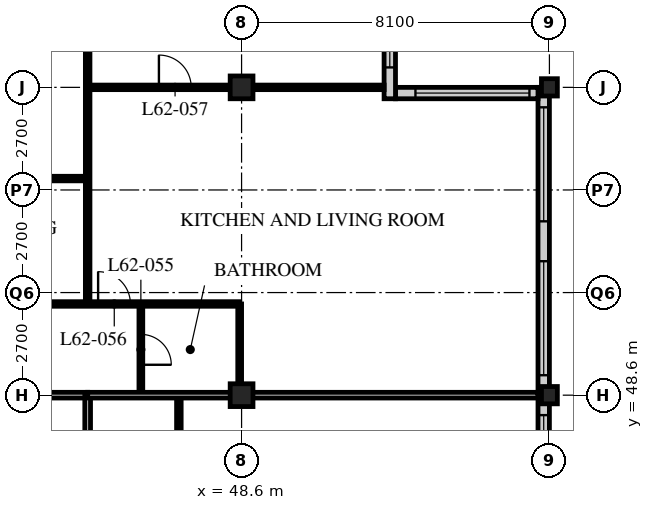
"""IFC4 building model, lengths in metres.
Left out: names, types, materials, properties, quantities, classifications, styles, units other than length and angle.
Written with IfcOpenShell. Run it as: python <this file> out.ifc"""

import sys

from ifc_helpers import new_model, si_unit, direction, frame, frame_2d, origin, origin_2d, place, context, subcontext, project, spatial, rectangle, hollow_rectangle, i_section, extrude, element, fill, save


model = new_model("IFC4")
c1 = context("Model", 3, precision=1e-05, world=origin(), true_north=direction((0.0, 1.0)))
c2 = subcontext(c1, "Body", "Model", "MODEL_VIEW")
j1 = project(units=[si_unit("LENGTHUNIT", "METRE"), si_unit("PLANEANGLEUNIT", "RADIAN")], contexts=[c1])
p1 = place(None, origin())
s1 = spatial("IfcSite", under=j1, at=p1, CompositionType="ELEMENT")
p2 = place(p1, origin())
s2 = spatial("IfcBuilding", under=s1, at=p2, CompositionType="ELEMENT")
p3 = place(p2, frame((0.0, 0.0, 242.4)))
s3 = spatial("IfcBuildingStorey", under=s2, at=p3, CompositionType="ELEMENT", Elevation=242.4)
for number, where, z_axis, x_axis in (
    (1, (48.6, 48.6, 0.0), (0.0, 0.0, 1.0), (1.0, 0.0, 0.0)),
    (2, (48.6, 56.7, 0.0), (0.0, 0.0, 1.0), (1.0, 0.0, 0.0)),
):
    element("IfcColumn", number, at=place(p3, frame(where, z_axis=z_axis, x_axis=x_axis)), inside=s3, PredefinedType="COLUMN", context=c2, shape_type="SweptSolid", body=[
        extrude(hollow_rectangle(XDim=0.6, YDim=0.6, WallThickness=0.05, at=origin_2d()), origin(), (0.0, 0.0, 1.0), 3.9),
    ])
for number, where, z_axis, x_axis in (
    (3, (56.7, 48.6, 0.0), (0.0, 0.0, 1.0), (1.0, 0.0, 0.0)),
    (4, (56.7, 56.7, 0.0), (0.0, 0.0, 1.0), (1.0, 0.0, 0.0)),
):
    element("IfcColumn", number, at=place(p3, frame(where, z_axis=z_axis, x_axis=x_axis)), inside=s3, PredefinedType="COLUMN", context=c2, shape_type="SweptSolid", body=[
        extrude(i_section(OverallWidth=0.418, OverallDepth=0.456, WebThickness=0.042, FlangeThickness=0.067, FilletRadius=0.015, at=origin_2d()), origin(), (0.0, 0.0, 1.0), 3.9),
    ])
p4 = place(p3, frame((56.55, 24.6, 0.0), z_axis=(0.0, 0.0, 1.0), x_axis=(0.0, 1.0, 0.0)))
e5 = element("IfcWall", 5, at=p4, inside=s3, PredefinedType="SOLIDWALL", context=c2, shape_type="SweptSolid", body=[
    extrude(rectangle(XDim=32.1, YDim=0.3, at=frame_2d((16.05, 0.0))), origin(), (0.0, 0.0, 1.0), 3.69),
])
p5 = place(p4, frame((0.225, 0.0, 0.6)))
e6 = element("IfcOpeningElement", 6, at=p5, cuts=e5, PredefinedType="OPENING", context=c2, shape_type="SweptSolid", body=[
    extrude(rectangle(XDim=3.0, YDim=2.3, at=frame_2d((1.5, 1.15))), frame((0.0, 0.16, 0.0), z_axis=(0.0, -1.0, 0.0), x_axis=(1.0, 0.0, 0.0)), (0.0, 0.0, 1.0), 0.32),
])
p6 = place(p4, frame((4.275, 0.0, 0.6)))
e7 = element("IfcOpeningElement", 7, at=p6, cuts=e5, PredefinedType="OPENING", context=c2, shape_type="SweptSolid", body=[
    extrude(rectangle(XDim=3.0, YDim=2.3, at=frame_2d((1.5, 1.15))), frame((0.0, 0.16, 0.0), z_axis=(0.0, -1.0, 0.0), x_axis=(1.0, 0.0, 0.0)), (0.0, 0.0, 1.0), 0.32),
])
p7 = place(p4, frame((8.325, 0.0, 0.6)))
e8 = element("IfcOpeningElement", 8, at=p7, cuts=e5, PredefinedType="OPENING", context=c2, shape_type="SweptSolid", body=[
    extrude(rectangle(XDim=3.0, YDim=2.3, at=frame_2d((1.5, 1.15))), frame((0.0, 0.16, 0.0), z_axis=(0.0, -1.0, 0.0), x_axis=(1.0, 0.0, 0.0)), (0.0, 0.0, 1.0), 0.32),
])
p8 = place(p4, frame((12.375, 0.0, 0.6)))
e9 = element("IfcOpeningElement", 9, at=p8, cuts=e5, PredefinedType="OPENING", context=c2, shape_type="SweptSolid", body=[
    extrude(rectangle(XDim=3.0, YDim=2.3, at=frame_2d((1.5, 1.15))), frame((0.0, 0.16, 0.0), z_axis=(0.0, -1.0, 0.0), x_axis=(1.0, 0.0, 0.0)), (0.0, 0.0, 1.0), 0.32),
])
p9 = place(p4, frame((16.425, 0.0, 0.6)))
e10 = element("IfcOpeningElement", 10, at=p9, cuts=e5, PredefinedType="OPENING", context=c2, shape_type="SweptSolid", body=[
    extrude(rectangle(XDim=3.0, YDim=2.3, at=frame_2d((1.5, 1.15))), frame((0.0, 0.16, 0.0), z_axis=(0.0, -1.0, 0.0), x_axis=(1.0, 0.0, 0.0)), (0.0, 0.0, 1.0), 0.32),
])
p10 = place(p4, frame((20.475, 0.0, 0.6)))
e11 = element("IfcOpeningElement", 11, at=p10, cuts=e5, PredefinedType="OPENING", context=c2, shape_type="SweptSolid", body=[
    extrude(rectangle(XDim=3.0, YDim=2.3, at=frame_2d((1.5, 1.15))), frame((0.0, 0.16, 0.0), z_axis=(0.0, -1.0, 0.0), x_axis=(1.0, 0.0, 0.0)), (0.0, 0.0, 1.0), 0.32),
])
p11 = place(p4, frame((24.525, 0.0, 0.6)))
e12 = element("IfcOpeningElement", 12, at=p11, cuts=e5, PredefinedType="OPENING", context=c2, shape_type="SweptSolid", body=[
    extrude(rectangle(XDim=3.0, YDim=2.3, at=frame_2d((1.5, 1.15))), frame((0.0, 0.16, 0.0), z_axis=(0.0, -1.0, 0.0), x_axis=(1.0, 0.0, 0.0)), (0.0, 0.0, 1.0), 0.32),
])
p12 = place(p4, frame((28.575, 0.0, 0.6)))
e13 = element("IfcOpeningElement", 13, at=p12, cuts=e5, PredefinedType="OPENING", context=c2, shape_type="SweptSolid", body=[
    extrude(rectangle(XDim=3.0, YDim=2.3, at=frame_2d((1.5, 1.15))), frame((0.0, 0.16, 0.0), z_axis=(0.0, -1.0, 0.0), x_axis=(1.0, 0.0, 0.0)), (0.0, 0.0, 1.0), 0.32),
])
p13 = place(p3, frame((56.4, 56.55, 0.0), z_axis=(0.0, 0.0, 1.0), x_axis=(-1.0, 0.0, 0.0)))
e14 = element("IfcWall", 14, at=p13, inside=s3, PredefinedType="SOLIDWALL", context=c2, shape_type="SweptSolid", body=[
    extrude(rectangle(XDim=3.75, YDim=0.3, at=frame_2d((1.875, 0.0))), origin(), (0.0, 0.0, 1.0), 3.69),
])
p14 = place(p13, frame((0.225, 0.0, 0.6)))
e15 = element("IfcOpeningElement", 15, at=p14, cuts=e14, PredefinedType="OPENING", context=c2, shape_type="SweptSolid", body=[
    extrude(rectangle(XDim=3.0, YDim=2.3, at=frame_2d((1.5, 1.15))), frame((0.0, 0.16, 0.0), z_axis=(0.0, -1.0, 0.0), x_axis=(1.0, 0.0, 0.0)), (0.0, 0.0, 1.0), 0.32),
])
p15 = place(p3, frame((52.5, 56.4, 0.0), z_axis=(0.0, 0.0, 1.0), x_axis=(0.0, 1.0, 0.0)))
e16 = element("IfcWall", 16, at=p15, inside=s3, PredefinedType="SOLIDWALL", context=c2, shape_type="SweptSolid", body=[
    extrude(rectangle(XDim=4.35, YDim=0.3, at=frame_2d((2.175, 0.0))), origin(), (0.0, 0.0, 1.0), 3.69),
])
p16 = place(p15, frame((0.825, 0.0, 0.6)))
e17 = element("IfcOpeningElement", 17, at=p16, cuts=e16, PredefinedType="OPENING", context=c2, shape_type="SweptSolid", body=[
    extrude(rectangle(XDim=3.0, YDim=2.3, at=frame_2d((1.5, 1.15))), frame((0.0, 0.16, 0.0), z_axis=(0.0, -1.0, 0.0), x_axis=(1.0, 0.0, 0.0)), (0.0, 0.0, 1.0), 0.32),
])
p17 = place(p3, frame((12.15, 48.6, 0.0), z_axis=(0.0, 0.0, 1.0), x_axis=(1.0, 0.0, 0.0)))
e18 = element("IfcWall", 18, at=p17, inside=s3, PredefinedType="PARTITIONING", context=c2, shape_type="SweptSolid", body=[
    extrude(rectangle(XDim=32.4, YDim=0.15, at=frame_2d((16.2, 0.0))), origin(), (0.0, 0.0, 1.0), 2.928),
])
p18 = place(p17, frame((4.95, 0.0, 0.0)))
e19 = element("IfcOpeningElement", 19, at=p18, cuts=e18, PredefinedType="OPENING", context=c2, shape_type="SweptSolid", body=[
    extrude(rectangle(XDim=1.0, YDim=2.1, at=frame_2d((0.5, 1.05))), frame((0.0, 0.085, 0.0), z_axis=(0.0, -1.0, 0.0), x_axis=(1.0, 0.0, 0.0)), (0.0, 0.0, 1.0), 0.17),
])
p19 = place(p17, frame((21.15, 0.0, 0.0)))
e20 = element("IfcOpeningElement", 20, at=p19, cuts=e18, PredefinedType="OPENING", context=c2, shape_type="SweptSolid", body=[
    extrude(rectangle(XDim=1.0, YDim=2.1, at=frame_2d((0.5, 1.05))), frame((0.0, 0.085, 0.0), z_axis=(0.0, -1.0, 0.0), x_axis=(1.0, 0.0, 0.0)), (0.0, 0.0, 1.0), 0.17),
])
p20 = place(p17, frame((29.875, 0.0, 0.0)))
e21 = element("IfcOpeningElement", 21, at=p20, cuts=e18, PredefinedType="OPENING", context=c2, shape_type="SweptSolid", body=[
    extrude(rectangle(XDim=1.0, YDim=2.1, at=frame_2d((0.5, 1.05))), frame((0.0, 0.085, 0.0), z_axis=(0.0, -1.0, 0.0), x_axis=(1.0, 0.0, 0.0)), (0.0, 0.0, 1.0), 0.17),
])
p21 = place(p17, frame((1.525, 0.0, 0.0)))
e22 = element("IfcOpeningElement", 22, at=p21, cuts=e18, PredefinedType="OPENING", context=c2, shape_type="SweptSolid", body=[
    extrude(rectangle(XDim=1.0, YDim=2.1, at=frame_2d((0.5, 1.05))), frame((0.0, 0.085, 0.0), z_axis=(0.0, -1.0, 0.0), x_axis=(1.0, 0.0, 0.0)), (0.0, 0.0, 1.0), 0.17),
])
p22 = place(p3, frame((44.55, 22.5, 0.0), z_axis=(0.0, 0.0, 1.0), x_axis=(0.0, 1.0, 0.0)))
e23 = element("IfcWall", 23, at=p22, inside=s3, PredefinedType="PARTITIONING", context=c2, shape_type="SweptSolid", body=[
    extrude(rectangle(XDim=26.1, YDim=0.15, at=frame_2d((13.05, 0.0))), origin(), (0.0, 0.0, 1.0), 3.69),
])
p23 = place(p22, frame((0.4, 0.0, 0.0)))
e24 = element("IfcOpeningElement", 24, at=p23, cuts=e23, PredefinedType="OPENING", context=c2, shape_type="SweptSolid", body=[
    extrude(rectangle(XDim=1.0, YDim=2.1, at=frame_2d((0.5, 1.05))), frame((0.0, 0.085, 0.0), z_axis=(0.0, -1.0, 0.0), x_axis=(1.0, 0.0, 0.0)), (0.0, 0.0, 1.0), 0.17),
])
p24 = place(p22, frame((10.3, 0.0, 0.0)))
e25 = element("IfcOpeningElement", 25, at=p24, cuts=e23, PredefinedType="OPENING", context=c2, shape_type="SweptSolid", body=[
    extrude(rectangle(XDim=1.0, YDim=2.1, at=frame_2d((0.5, 1.05))), frame((0.0, 0.085, 0.0), z_axis=(0.0, -1.0, 0.0), x_axis=(1.0, 0.0, 0.0)), (0.0, 0.0, 1.0), 0.17),
])
p25 = place(p3, frame((46.95, 22.5, 0.0), z_axis=(0.0, 0.0, 1.0), x_axis=(0.0, 1.0, 0.0)))
e26 = element("IfcWall", 26, at=p25, inside=s3, PredefinedType="PARTITIONING", context=c2, shape_type="SweptSolid", body=[
    extrude(rectangle(XDim=26.1, YDim=0.12, at=frame_2d((13.05, 0.0))), origin(), (0.0, 0.0, 1.0), 3.69),
])
p26 = place(p25, frame((0.975, 0.0, 0.0)))
e27 = element("IfcOpeningElement", 27, at=p26, cuts=e26, PredefinedType="OPENING", context=c2, shape_type="SweptSolid", body=[
    extrude(rectangle(XDim=0.85, YDim=2.1, at=frame_2d((0.425, 1.05))), frame((0.0, 0.07, 0.0), z_axis=(0.0, -1.0, 0.0), x_axis=(1.0, 0.0, 0.0)), (0.0, 0.0, 1.0), 0.14),
])
p27 = place(p25, frame((6.175, 0.0, 0.0)))
e28 = element("IfcOpeningElement", 28, at=p27, cuts=e26, PredefinedType="OPENING", context=c2, shape_type="SweptSolid", body=[
    extrude(rectangle(XDim=0.85, YDim=2.1, at=frame_2d((0.425, 1.05))), frame((0.0, 0.07, 0.0), z_axis=(0.0, -1.0, 0.0), x_axis=(1.0, 0.0, 0.0)), (0.0, 0.0, 1.0), 0.14),
])
p28 = place(p25, frame((10.875, 0.0, 0.0)))
e29 = element("IfcOpeningElement", 29, at=p28, cuts=e26, PredefinedType="OPENING", context=c2, shape_type="SweptSolid", body=[
    extrude(rectangle(XDim=0.85, YDim=2.1, at=frame_2d((0.425, 1.05))), frame((0.0, 0.07, 0.0), z_axis=(0.0, -1.0, 0.0), x_axis=(1.0, 0.0, 0.0)), (0.0, 0.0, 1.0), 0.14),
])
p29 = place(p25, frame((18.325, 0.0, 0.0)))
e30 = element("IfcOpeningElement", 30, at=p29, cuts=e26, PredefinedType="OPENING", context=c2, shape_type="SweptSolid", body=[
    extrude(rectangle(XDim=0.85, YDim=2.1, at=frame_2d((0.425, 1.05))), frame((0.0, 0.07, 0.0), z_axis=(0.0, -1.0, 0.0), x_axis=(1.0, 0.0, 0.0)), (0.0, 0.0, 1.0), 0.14),
])
p30 = place(p25, frame((22.375, 0.0, 0.0)))
e31 = element("IfcOpeningElement", 31, at=p30, cuts=e26, PredefinedType="OPENING", context=c2, shape_type="SweptSolid", body=[
    extrude(rectangle(XDim=0.85, YDim=2.1, at=frame_2d((0.425, 1.05))), frame((0.0, 0.07, 0.0), z_axis=(0.0, -1.0, 0.0), x_axis=(1.0, 0.0, 0.0)), (0.0, 0.0, 1.0), 0.14),
])
p31 = place(p3, frame((45.95, 48.6, 0.0), z_axis=(0.0, 0.0, 1.0), x_axis=(0.0, 1.0, 0.0)))
e32 = element("IfcWall", 32, at=p31, inside=s3, PredefinedType="PARTITIONING", context=c2, shape_type="SweptSolid", body=[
    extrude(rectangle(XDim=2.4, YDim=0.1, at=frame_2d((1.2, 0.0))), origin(), (0.0, 0.0, 1.0), 3.69),
])
p32 = place(p31, frame((0.8, 0.0, 0.0)))
e33 = element("IfcOpeningElement", 33, at=p32, cuts=e32, PredefinedType="OPENING", context=c2, shape_type="SweptSolid", body=[
    extrude(rectangle(XDim=0.8, YDim=2.1, at=frame_2d((0.4, 1.05))), frame((0.0, 0.06, 0.0), z_axis=(0.0, -1.0, 0.0), x_axis=(1.0, 0.0, 0.0)), (0.0, 0.0, 1.0), 0.12),
])
p33 = place(p3, frame((48.55, 48.6, 0.0), z_axis=(0.0, 0.0, 1.0), x_axis=(0.0, 1.0, 0.0)))
e34 = element("IfcWall", 34, at=p33, inside=s3, PredefinedType="PARTITIONING", context=c2, shape_type="SweptSolid", body=[
    extrude(rectangle(XDim=2.4, YDim=0.1, at=frame_2d((1.2, 0.0))), origin(), (0.0, 0.0, 1.0), 2.928),
])
p34 = place(p3, frame((44.55, 51.0, 0.0), z_axis=(0.0, 0.0, 1.0), x_axis=(0.0, 1.0, 0.0)))
e35 = element("IfcWall", 35, at=p34, inside=s3, PredefinedType="PARTITIONING", context=c2, shape_type="SweptSolid", body=[
    extrude(rectangle(XDim=13.5, YDim=0.12, at=frame_2d((6.75, 0.0))), origin(), (0.0, 0.0, 1.0), 3.69),
])
p35 = place(p3, frame((44.55, 56.7, 0.0), z_axis=(0.0, 0.0, 1.0), x_axis=(1.0, 0.0, 0.0)))
e36 = element("IfcWall", 36, at=p35, inside=s3, PredefinedType="PARTITIONING", context=c2, shape_type="SweptSolid", body=[
    extrude(rectangle(XDim=7.8, YDim=0.12, at=frame_2d((3.9, 0.0))), origin(), (0.0, 0.0, 1.0), 2.928),
])
p36 = place(p35, frame((1.875, 0.0, 0.0)))
e37 = element("IfcOpeningElement", 37, at=p36, cuts=e36, PredefinedType="OPENING", context=c2, shape_type="SweptSolid", body=[
    extrude(rectangle(XDim=0.85, YDim=2.1, at=frame_2d((0.425, 1.05))), frame((0.0, 0.07, 0.0), z_axis=(0.0, -1.0, 0.0), x_axis=(1.0, 0.0, 0.0)), (0.0, 0.0, 1.0), 0.14),
])
p37 = place(p3, frame((44.55, 48.6, 0.0), z_axis=(0.0, 0.0, 1.0), x_axis=(1.0, 0.0, 0.0)))
e38 = element("IfcWall", 38, at=p37, inside=s3, PredefinedType="PARTITIONING", context=c2, shape_type="SweptSolid", body=[
    extrude(rectangle(XDim=11.85, YDim=0.15, at=frame_2d((5.925, 0.0))), origin(), (0.0, 0.0, 1.0), 2.928),
])
p38 = place(p3, frame((8.15, 51.0, 0.0), z_axis=(0.0, 0.0, 1.0), x_axis=(1.0, 0.0, 0.0)))
e39 = element("IfcWall", 39, at=p38, inside=s3, PredefinedType="PARTITIONING", context=c2, shape_type="SweptSolid", body=[
    extrude(rectangle(XDim=40.4, YDim=0.12, at=frame_2d((20.2, 0.0))), origin(), (0.0, 0.0, 1.0), 3.69),
])
p39 = place(p38, frame((9.025, 0.0, 0.0)))
e40 = element("IfcOpeningElement", 40, at=p39, cuts=e39, PredefinedType="OPENING", context=c2, shape_type="SweptSolid", body=[
    extrude(rectangle(XDim=0.85, YDim=2.1, at=frame_2d((0.425, 1.05))), frame((0.0, 0.07, 0.0), z_axis=(0.0, -1.0, 0.0), x_axis=(1.0, 0.0, 0.0)), (0.0, 0.0, 1.0), 0.14),
])
p40 = place(p38, frame((16.475, 0.0, 0.0)))
e41 = element("IfcOpeningElement", 41, at=p40, cuts=e39, PredefinedType="OPENING", context=c2, shape_type="SweptSolid", body=[
    extrude(rectangle(XDim=0.85, YDim=2.1, at=frame_2d((0.425, 1.05))), frame((0.0, 0.07, 0.0), z_axis=(0.0, -1.0, 0.0), x_axis=(1.0, 0.0, 0.0)), (0.0, 0.0, 1.0), 0.14),
])
p41 = place(p38, frame((20.525, 0.0, 0.0)))
e42 = element("IfcOpeningElement", 42, at=p41, cuts=e39, PredefinedType="OPENING", context=c2, shape_type="SweptSolid", body=[
    extrude(rectangle(XDim=0.85, YDim=2.1, at=frame_2d((0.425, 1.05))), frame((0.0, 0.07, 0.0), z_axis=(0.0, -1.0, 0.0), x_axis=(1.0, 0.0, 0.0)), (0.0, 0.0, 1.0), 0.14),
])
p42 = place(p38, frame((25.225, 0.0, 0.0)))
e43 = element("IfcOpeningElement", 43, at=p42, cuts=e39, PredefinedType="OPENING", context=c2, shape_type="SweptSolid", body=[
    extrude(rectangle(XDim=0.85, YDim=2.1, at=frame_2d((0.425, 1.05))), frame((0.0, 0.07, 0.0), z_axis=(0.0, -1.0, 0.0), x_axis=(1.0, 0.0, 0.0)), (0.0, 0.0, 1.0), 0.14),
])
p43 = place(p38, frame((28.625, 0.0, 0.0)))
e44 = element("IfcOpeningElement", 44, at=p43, cuts=e39, PredefinedType="OPENING", context=c2, shape_type="SweptSolid", body=[
    extrude(rectangle(XDim=0.85, YDim=2.1, at=frame_2d((0.425, 1.05))), frame((0.0, 0.07, 0.0), z_axis=(0.0, -1.0, 0.0), x_axis=(1.0, 0.0, 0.0)), (0.0, 0.0, 1.0), 0.14),
])
p44 = place(p38, frame((32.825, 0.0, 0.0)))
e45 = element("IfcOpeningElement", 45, at=p44, cuts=e39, PredefinedType="OPENING", context=c2, shape_type="SweptSolid", body=[
    extrude(rectangle(XDim=0.85, YDim=2.1, at=frame_2d((0.425, 1.05))), frame((0.0, 0.07, 0.0), z_axis=(0.0, -1.0, 0.0), x_axis=(1.0, 0.0, 0.0)), (0.0, 0.0, 1.0), 0.14),
])
p45 = place(p38, frame((36.675, 0.0, 0.0)))
e46 = element("IfcOpeningElement", 46, at=p45, cuts=e39, PredefinedType="OPENING", context=c2, shape_type="SweptSolid", body=[
    extrude(rectangle(XDim=0.85, YDim=2.1, at=frame_2d((0.425, 1.05))), frame((0.0, 0.07, 0.0), z_axis=(0.0, -1.0, 0.0), x_axis=(1.0, 0.0, 0.0)), (0.0, 0.0, 1.0), 0.14),
])
p46 = place(p38, frame((6.725, 0.0, 0.0)))
e47 = element("IfcOpeningElement", 47, at=p46, cuts=e39, PredefinedType="OPENING", context=c2, shape_type="SweptSolid", body=[
    extrude(rectangle(XDim=0.85, YDim=2.1, at=frame_2d((0.425, 1.05))), frame((0.0, 0.07, 0.0), z_axis=(0.0, -1.0, 0.0), x_axis=(1.0, 0.0, 0.0)), (0.0, 0.0, 1.0), 0.14),
])
p47 = place(p38, frame((2.875, 0.0, 0.0)))
e48 = element("IfcOpeningElement", 48, at=p47, cuts=e39, PredefinedType="OPENING", context=c2, shape_type="SweptSolid", body=[
    extrude(rectangle(XDim=0.85, YDim=2.1, at=frame_2d((0.425, 1.05))), frame((0.0, 0.07, 0.0), z_axis=(0.0, -1.0, 0.0), x_axis=(1.0, 0.0, 0.0)), (0.0, 0.0, 1.0), 0.14),
])
p48 = place(p3, frame((36.45, 54.3, 0.0), z_axis=(0.0, 0.0, 1.0), x_axis=(1.0, 0.0, 0.0)))
e49 = element("IfcWall", 49, at=p48, inside=s3, PredefinedType="PARTITIONING", context=c2, shape_type="SweptSolid", body=[
    extrude(rectangle(XDim=8.1, YDim=0.12, at=frame_2d((4.05, 0.0))), origin(), (0.0, 0.0, 1.0), 3.69),
])
p49 = place(p48, frame((1.6, 0.0, 0.0)))
e50 = element("IfcOpeningElement", 50, at=p49, cuts=e49, PredefinedType="OPENING", context=c2, shape_type="SweptSolid", body=[
    extrude(rectangle(XDim=0.85, YDim=2.1, at=frame_2d((0.425, 1.05))), frame((0.0, 0.07, 0.0), z_axis=(0.0, -1.0, 0.0), x_axis=(1.0, 0.0, 0.0)), (0.0, 0.0, 1.0), 0.14),
])
p50 = place(p48, frame((5.65, 0.0, 0.0)))
e51 = element("IfcOpeningElement", 51, at=p50, cuts=e49, PredefinedType="OPENING", context=c2, shape_type="SweptSolid", body=[
    extrude(rectangle(XDim=0.85, YDim=2.1, at=frame_2d((0.425, 1.05))), frame((0.0, 0.07, 0.0), z_axis=(0.0, -1.0, 0.0), x_axis=(1.0, 0.0, 0.0)), (0.0, 0.0, 1.0), 0.14),
])
p51 = place(p10, origin())
e52 = element("IfcWindow", 52, at=p51, inside=s3, PartitioningType="SINGLE_PANEL", PredefinedType="WINDOW", context=c2, shape_type="SweptSolid", body=[
    extrude(rectangle(XDim=3.0, YDim=2.3, at=frame_2d((1.5, 1.15))), frame((0.0, 0.03, 0.0), z_axis=(0.0, -1.0, 0.0), x_axis=(1.0, 0.0, 0.0)), (0.0, 0.0, 1.0), 0.06),
])
fill(e11, e52)
p52 = place(p11, origin())
e53 = element("IfcWindow", 53, at=p52, inside=s3, PartitioningType="SINGLE_PANEL", PredefinedType="WINDOW", context=c2, shape_type="SweptSolid", body=[
    extrude(rectangle(XDim=3.0, YDim=2.3, at=frame_2d((1.5, 1.15))), frame((0.0, 0.03, 0.0), z_axis=(0.0, -1.0, 0.0), x_axis=(1.0, 0.0, 0.0)), (0.0, 0.0, 1.0), 0.06),
])
fill(e12, e53)
p53 = place(p12, origin())
e54 = element("IfcWindow", 54, at=p53, inside=s3, PartitioningType="SINGLE_PANEL", PredefinedType="WINDOW", context=c2, shape_type="SweptSolid", body=[
    extrude(rectangle(XDim=3.0, YDim=2.3, at=frame_2d((1.5, 1.15))), frame((0.0, 0.03, 0.0), z_axis=(0.0, -1.0, 0.0), x_axis=(1.0, 0.0, 0.0)), (0.0, 0.0, 1.0), 0.06),
])
fill(e13, e54)
p54 = place(p14, origin())
e55 = element("IfcWindow", 55, at=p54, inside=s3, PartitioningType="SINGLE_PANEL", PredefinedType="WINDOW", context=c2, shape_type="SweptSolid", body=[
    extrude(rectangle(XDim=3.0, YDim=2.3, at=frame_2d((1.5, 1.15))), frame((0.0, 0.03, 0.0), z_axis=(0.0, -1.0, 0.0), x_axis=(1.0, 0.0, 0.0)), (0.0, 0.0, 1.0), 0.06),
])
fill(e15, e55)
p55 = place(p16, origin())
e56 = element("IfcWindow", 56, at=p55, inside=s3, PartitioningType="SINGLE_PANEL", PredefinedType="WINDOW", context=c2, shape_type="SweptSolid", body=[
    extrude(rectangle(XDim=3.0, YDim=2.3, at=frame_2d((1.5, 1.15))), frame((0.0, 0.03, 0.0), z_axis=(0.0, -1.0, 0.0), x_axis=(1.0, 0.0, 0.0)), (0.0, 0.0, 1.0), 0.06),
])
fill(e17, e56)
p56 = place(p32, origin())
e57 = element("IfcDoor", 57, at=p56, inside=s3, OperationType="SINGLE_SWING_RIGHT", PredefinedType="DOOR", context=c2, shape_type="SweptSolid", body=[
    extrude(rectangle(XDim=0.8, YDim=2.1, at=frame_2d((0.4, 1.05))), frame((0.0, 0.025, 0.0), z_axis=(0.0, -1.0, 0.0), x_axis=(1.0, 0.0, 0.0)), (0.0, 0.0, 1.0), 0.05),
])
fill(e33, e57)
p57 = place(p45, origin())
e58 = element("IfcDoor", 58, at=p57, inside=s3, OperationType="SINGLE_SWING_LEFT", PredefinedType="DOOR", context=c2, shape_type="SweptSolid", body=[
    extrude(rectangle(XDim=0.85, YDim=2.1, at=frame_2d((0.425, 1.05))), frame((0.0, 0.025, 0.0), z_axis=(0.0, -1.0, 0.0), x_axis=(1.0, 0.0, 0.0)), (0.0, 0.0, 1.0), 0.05),
])
fill(e46, e58)
p58 = place(p36, origin())
e59 = element("IfcDoor", 59, at=p58, inside=s3, OperationType="SINGLE_SWING_LEFT", PredefinedType="DOOR", context=c2, shape_type="SweptSolid", body=[
    extrude(rectangle(XDim=0.85, YDim=2.1, at=frame_2d((0.425, 1.05))), frame((0.0, 0.025, 0.0), z_axis=(0.0, -1.0, 0.0), x_axis=(1.0, 0.0, 0.0)), (0.0, 0.0, 1.0), 0.05),
])
fill(e37, e59)
save(model, sys.argv[1])
